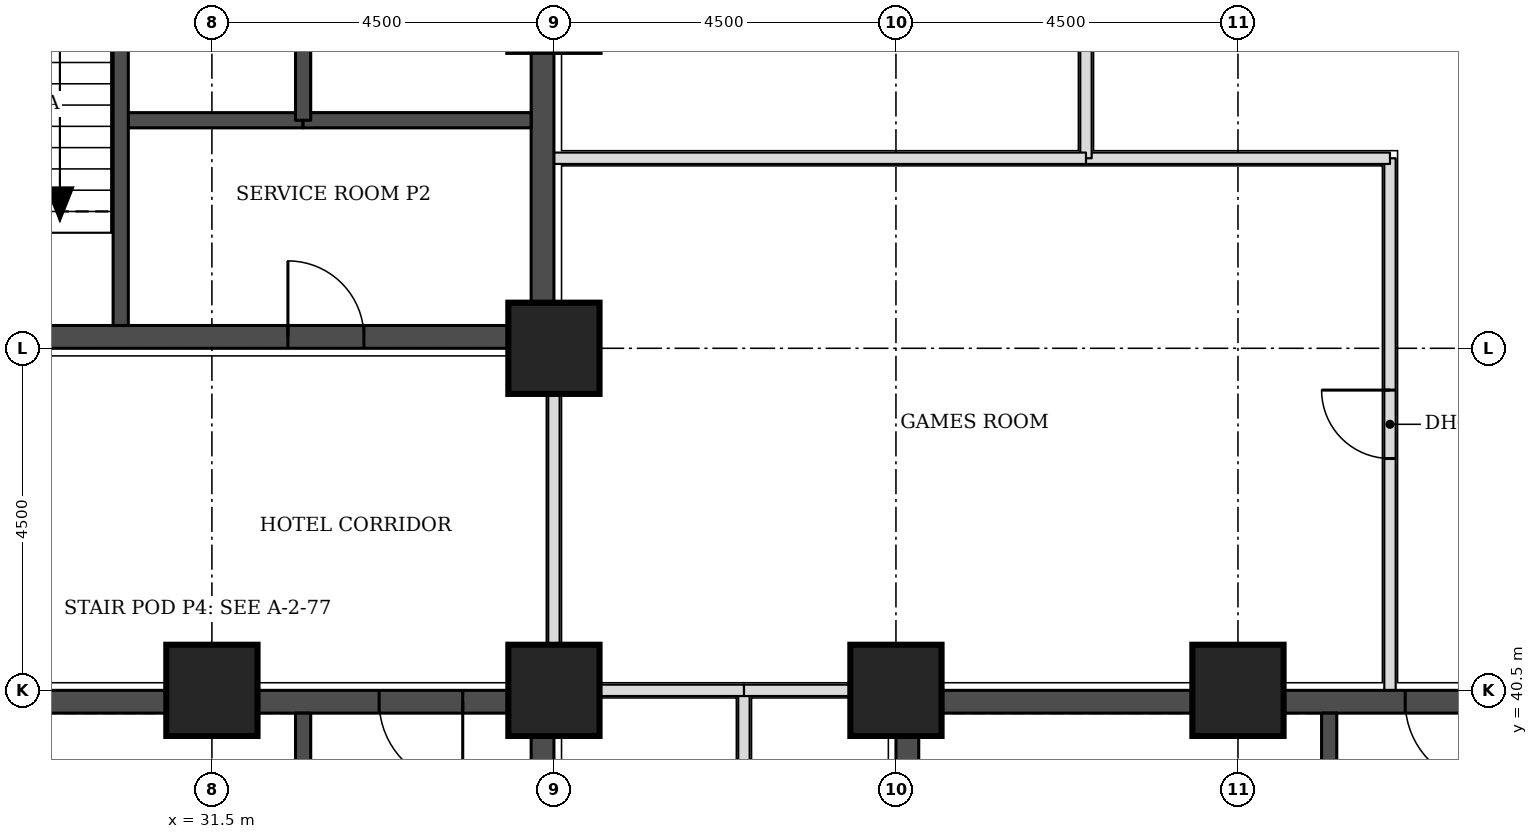
"""IFC4 building model, lengths in metres.
Left out: names, types, materials, properties, quantities, classifications, styles, units other than length and angle.
Written with IfcOpenShell. Run it as: python <this file> out.ifc"""

import sys

from ifc_helpers import new_model, si_unit, direction, frame, frame_2d, origin, origin_2d, place, context, subcontext, project, spatial, rectangle, extrude, element, fill, save


model = new_model("IFC4")
c1 = context("Model", 3, precision=1e-05, world=origin(), true_north=direction((0.0, 1.0)))
c2 = subcontext(c1, "Body", "Model", "MODEL_VIEW")
j1 = project(units=[si_unit("LENGTHUNIT", "METRE"), si_unit("PLANEANGLEUNIT", "RADIAN")], contexts=[c1])
p1 = place(None, origin())
s1 = spatial("IfcSite", under=j1, at=p1, CompositionType="ELEMENT")
p2 = place(p1, origin())
s2 = spatial("IfcBuilding", under=s1, at=p2, CompositionType="ELEMENT")
p3 = place(p2, frame((0.0, 0.0, 39.6)))
s3 = spatial("IfcBuildingStorey", under=s2, at=p3, CompositionType="ELEMENT", Elevation=39.6)
for number, where, z_axis, x_axis in (
    (1, (31.5, 40.5, 0.0), (0.0, 0.0, 1.0), (1.0, 0.0, 0.0)),
    (2, (36.0, 40.5, 0.0), (0.0, 0.0, 1.0), (1.0, 0.0, 0.0)),
    (3, (40.5, 40.5, 0.0), (0.0, 0.0, 1.0), (1.0, 0.0, 0.0)),
    (4, (45.0, 40.5, 0.0), (0.0, 0.0, 1.0), (1.0, 0.0, 0.0)),
    (5, (36.0, 45.0, 0.0), (0.0, 0.0, 1.0), (1.0, 0.0, 0.0)),
):
    element("IfcColumn", number, at=place(p3, frame(where, z_axis=z_axis, x_axis=x_axis)), inside=s3, PredefinedType="COLUMN", context=c2, shape_type="SweptSolid", body=[
        extrude(rectangle(XDim=1.2, YDim=1.2, at=origin_2d()), origin(), (0.0, 0.0, 1.0), 3.3),
    ])
p4 = place(p3, frame((27.3, 45.15, 0.0), z_axis=(0.0, 0.0, 1.0), x_axis=(1.0, 0.0, 0.0)))
e6 = element("IfcWall", 6, at=p4, inside=s3, PredefinedType="SHEAR", context=c2, shape_type="SweptSolid", body=[
    extrude(rectangle(XDim=8.4, YDim=0.3, at=frame_2d((4.2, 0.0))), origin(), (0.0, 0.0, 1.0), 3.3),
])
p5 = place(p4, frame((5.2, 0.0, 0.0)))
e7 = element("IfcOpeningElement", 7, at=p5, cuts=e6, PredefinedType="OPENING", context=c2, shape_type="SweptSolid", body=[
    extrude(rectangle(XDim=1.0, YDim=2.1, at=frame_2d((0.5, 1.05))), frame((0.0, 0.16, 0.0), z_axis=(0.0, -1.0, 0.0), x_axis=(1.0, 0.0, 0.0)), (0.0, 0.0, 1.0), 0.32),
])
p6 = place(p3, frame((35.85, 45.0, 0.0), z_axis=(0.0, 0.0, 1.0), x_axis=(0.0, 1.0, 0.0)))
e8 = element("IfcWall", 8, at=p6, inside=s3, PredefinedType="SHEAR", context=c2, shape_type="SweptSolid", body=[
    extrude(rectangle(XDim=9.0, YDim=0.3, at=frame_2d((4.5, 0.0))), origin(), (0.0, 0.0, 1.0), 3.3),
])
p7 = place(p3, frame((40.8, 40.35, 0.0), z_axis=(0.0, 0.0, 1.0), x_axis=(1.0, 0.0, 0.0)))
e9 = element("IfcWall", 9, at=p7, inside=s3, PredefinedType="SHEAR", context=c2, shape_type="SweptSolid", body=[
    extrude(rectangle(XDim=8.4, YDim=0.3, at=frame_2d((4.2, 0.0))), origin(), (0.0, 0.0, 1.0), 3.3),
])
p8 = place(p7, frame((6.4, 0.0, 0.0)))
e10 = element("IfcOpeningElement", 10, at=p8, cuts=e9, PredefinedType="OPENING", context=c2, shape_type="SweptSolid", body=[
    extrude(rectangle(XDim=1.1, YDim=2.1, at=frame_2d((0.55, 1.05))), frame((0.0, 0.16, 0.0), z_axis=(0.0, -1.0, 0.0), x_axis=(1.0, 0.0, 0.0)), (0.0, 0.0, 1.0), 0.32),
])
p9 = place(p3, frame((40.65, 31.5, 0.0), z_axis=(0.0, 0.0, 1.0), x_axis=(0.0, 1.0, 0.0)))
e11 = element("IfcWall", 11, at=p9, inside=s3, PredefinedType="SHEAR", context=c2, shape_type="SweptSolid", body=[
    extrude(rectangle(XDim=9.0, YDim=0.3, at=frame_2d((4.5, 0.0))), origin(), (0.0, 0.0, 1.0), 3.3),
])
p10 = place(p9, frame((0.4, 0.0, 0.0)))
e12 = element("IfcOpeningElement", 12, at=p10, cuts=e11, PredefinedType="OPENING", context=c2, shape_type="SweptSolid", body=[
    extrude(rectangle(XDim=1.1, YDim=2.1, at=frame_2d((0.55, 1.05))), frame((0.0, 0.16, 0.0), z_axis=(0.0, -1.0, 0.0), x_axis=(1.0, 0.0, 0.0)), (0.0, 0.0, 1.0), 0.32),
])
p11 = place(p3, frame((27.3, 40.35, 0.0), z_axis=(0.0, 0.0, 1.0), x_axis=(1.0, 0.0, 0.0)))
e13 = element("IfcWall", 13, at=p11, inside=s3, PredefinedType="SHEAR", context=c2, shape_type="SweptSolid", body=[
    extrude(rectangle(XDim=8.4, YDim=0.3, at=frame_2d((4.2, 0.0))), origin(), (0.0, 0.0, 1.0), 3.3),
])
p12 = place(p11, frame((6.4, 0.0, 0.0)))
e14 = element("IfcOpeningElement", 14, at=p12, cuts=e13, PredefinedType="OPENING", context=c2, shape_type="SweptSolid", body=[
    extrude(rectangle(XDim=1.1, YDim=2.1, at=frame_2d((0.55, 1.05))), frame((0.0, 0.16, 0.0), z_axis=(0.0, -1.0, 0.0), x_axis=(1.0, 0.0, 0.0)), (0.0, 0.0, 1.0), 0.32),
])
p13 = place(p3, frame((35.85, 31.5, 0.0), z_axis=(0.0, 0.0, 1.0), x_axis=(0.0, 1.0, 0.0)))
e15 = element("IfcWall", 15, at=p13, inside=s3, PredefinedType="SHEAR", context=c2, shape_type="SweptSolid", body=[
    extrude(rectangle(XDim=9.0, YDim=0.3, at=frame_2d((4.5, 0.0))), origin(), (0.0, 0.0, 1.0), 3.3),
])
p14 = place(p3, frame((38.5, 27.15, 0.0), z_axis=(0.0, 0.0, 1.0), x_axis=(0.0, 1.0, 0.0)))
e16 = element("IfcWall", 16, at=p14, inside=s3, PredefinedType="PARTITIONING", context=c2, shape_type="SweptSolid", body=[
    extrude(rectangle(XDim=13.35, YDim=0.15, at=frame_2d((6.675, 0.0))), origin(), (0.0, 0.0, 1.0), 3.08),
])
p15 = place(p14, frame((6.225, 0.0, 0.0)))
e17 = element("IfcOpeningElement", 17, at=p15, cuts=e16, PredefinedType="OPENING", context=c2, shape_type="SweptSolid", body=[
    extrude(rectangle(XDim=0.9, YDim=2.1, at=frame_2d((0.45, 1.05))), frame((0.0, 0.085, 0.0), z_axis=(0.0, -1.0, 0.0), x_axis=(1.0, 0.0, 0.0)), (0.0, 0.0, 1.0), 0.17),
])
p16 = place(p3, frame((38.5, 40.5, 0.0), z_axis=(0.0, 0.0, 1.0), x_axis=(1.0, 0.0, 0.0)))
e18 = element("IfcWall", 18, at=p16, inside=s3, PredefinedType="PARTITIONING", context=c2, shape_type="SweptSolid", body=[
    extrude(rectangle(XDim=1.95, YDim=0.15, at=frame_2d((0.975, 0.0))), origin(), (0.0, 0.0, 1.0), 2.33),
])
p17 = place(p3, frame((36.0, 40.55, 0.0), z_axis=(0.0, 0.0, 1.0), x_axis=(0.0, 1.0, 0.0)))
e19 = element("IfcWall", 19, at=p17, inside=s3, PredefinedType="PARTITIONING", context=c2, shape_type="SweptSolid", body=[
    extrude(rectangle(XDim=4.4, YDim=0.15, at=frame_2d((2.2, 0.0))), origin(), (0.0, 0.0, 1.0), 2.33),
])
p18 = place(p3, frame((47.0, 40.5, 0.0), z_axis=(0.0, 0.0, 1.0), x_axis=(0.0, 1.0, 0.0)))
e20 = element("IfcWall", 20, at=p18, inside=s3, PredefinedType="PARTITIONING", context=c2, shape_type="SweptSolid", body=[
    extrude(rectangle(XDim=7.0, YDim=0.15, at=frame_2d((3.5, 0.0))), origin(), (0.0, 0.0, 1.0), 3.08),
])
p19 = place(p18, frame((3.05, 0.0, 0.0)))
e21 = element("IfcOpeningElement", 21, at=p19, cuts=e20, PredefinedType="OPENING", context=c2, shape_type="SweptSolid", body=[
    extrude(rectangle(XDim=0.9, YDim=2.1, at=frame_2d((0.45, 1.05))), frame((0.0, 0.085, 0.0), z_axis=(0.0, -1.0, 0.0), x_axis=(1.0, 0.0, 0.0)), (0.0, 0.0, 1.0), 0.17),
])
p20 = place(p3, frame((43.0, 47.5, 0.0), z_axis=(0.0, 0.0, 1.0), x_axis=(1.0, 0.0, 0.0)))
e22 = element("IfcWall", 22, at=p20, inside=s3, PredefinedType="PARTITIONING", context=c2, shape_type="SweptSolid", body=[
    extrude(rectangle(XDim=4.0, YDim=0.15, at=frame_2d((2.0, 0.0))), origin(), (0.0, 0.0, 1.0), 3.08),
])
p21 = place(p3, frame((43.0, 47.5, 0.0), z_axis=(0.0, 0.0, 1.0), x_axis=(0.0, 1.0, 0.0)))
e23 = element("IfcWall", 23, at=p21, inside=s3, PredefinedType="PARTITIONING", context=c2, shape_type="SweptSolid", body=[
    extrude(rectangle(XDim=7.85, YDim=0.15, at=frame_2d((3.925, 0.0))), origin(), (0.0, 0.0, 1.0), 3.08),
])
p22 = place(p21, frame((3.475, 0.0, 0.0)))
e24 = element("IfcOpeningElement", 24, at=p22, cuts=e23, PredefinedType="OPENING", context=c2, shape_type="SweptSolid", body=[
    extrude(rectangle(XDim=0.9, YDim=2.1, at=frame_2d((0.45, 1.05))), frame((0.0, 0.085, 0.0), z_axis=(0.0, -1.0, 0.0), x_axis=(1.0, 0.0, 0.0)), (0.0, 0.0, 1.0), 0.17),
])
p23 = place(p3, frame((36.05, 40.5, 0.0), z_axis=(0.0, 0.0, 1.0), x_axis=(1.0, 0.0, 0.0)))
e25 = element("IfcWall", 25, at=p23, inside=s3, PredefinedType="PARTITIONING", context=c2, shape_type="SweptSolid", body=[
    extrude(rectangle(XDim=2.45, YDim=0.15, at=frame_2d((1.225, 0.0))), origin(), (0.0, 0.0, 1.0), 2.33),
])
p24 = place(p3, frame((36.0, 47.5, 0.0), z_axis=(0.0, 0.0, 1.0), x_axis=(1.0, 0.0, 0.0)))
e26 = element("IfcWall", 26, at=p24, inside=s3, PredefinedType="PARTITIONING", context=c2, shape_type="SweptSolid", body=[
    extrude(rectangle(XDim=7.0, YDim=0.15, at=frame_2d((3.5, 0.0))), origin(), (0.0, 0.0, 1.0), 3.08),
])
p25 = place(p3, frame((30.3, 48.0, 0.0), z_axis=(0.0, 0.0, 1.0), x_axis=(1.0, 0.0, 0.0)))
e27 = element("IfcWall", 27, at=p25, inside=s3, PredefinedType="SOLIDWALL", context=c2, shape_type="SweptSolid", body=[
    extrude(rectangle(XDim=2.4, YDim=0.2, at=frame_2d((1.2, 0.0))), origin(), (0.0, 0.0, 1.0), 3.08),
])
p26 = place(p3, frame((32.7, 48.0, 0.0), z_axis=(0.0, 0.0, 1.0), x_axis=(1.0, 0.0, 0.0)))
e28 = element("IfcWall", 28, at=p26, inside=s3, PredefinedType="SOLIDWALL", context=c2, shape_type="SweptSolid", body=[
    extrude(rectangle(XDim=3.0, YDim=0.2, at=frame_2d((1.5, 0.0))), origin(), (0.0, 0.0, 1.0), 3.08),
])
for number, where, z_axis, x_axis in (
    (29, (30.3, 45.3, 0.0), (0.0, 0.0, 1.0), (0.0, 1.0, 0.0)),
    (30, (32.7, 48.0, 0.0), (0.0, 0.0, 1.0), (0.0, 1.0, 0.0)),
    (31, (46.2, 34.5, 0.0), (0.0, 0.0, 1.0), (0.0, 1.0, 0.0)),
    (32, (32.7, 34.5, 0.0), (0.0, 0.0, 1.0), (0.0, 1.0, 0.0)),
):
    element("IfcWall", number, at=place(p3, frame(where, z_axis=z_axis, x_axis=x_axis)), inside=s3, PredefinedType="SOLIDWALL", context=c2, shape_type="SweptSolid", body=[
        extrude(rectangle(XDim=5.7, YDim=0.2, at=frame_2d((2.85, 0.0))), origin(), (0.0, 0.0, 1.0), 3.08),
    ])
p27 = place(p19, origin())
e33 = element("IfcDoor", 33, at=p27, inside=s3, OperationType="SINGLE_SWING_RIGHT", PredefinedType="DOOR", context=c2, shape_type="SweptSolid", body=[
    extrude(rectangle(XDim=0.9, YDim=2.1, at=frame_2d((0.45, 1.05))), frame((0.0, 0.025, 0.0), z_axis=(0.0, -1.0, 0.0), x_axis=(1.0, 0.0, 0.0)), (0.0, 0.0, 1.0), 0.05),
])
fill(e21, e33)
p28 = place(p5, origin())
e34 = element("IfcDoor", 34, at=p28, inside=s3, OperationType="SINGLE_SWING_LEFT", PredefinedType="DOOR", context=c2, shape_type="SweptSolid", body=[
    extrude(rectangle(XDim=1.0, YDim=2.1, at=frame_2d((0.5, 1.05))), frame((0.0, 0.025, 0.0), z_axis=(0.0, -1.0, 0.0), x_axis=(1.0, 0.0, 0.0)), (0.0, 0.0, 1.0), 0.05),
])
fill(e7, e34)
p29 = place(p8, frame((1.1, 0.0, 0.0), z_axis=(0.0, 0.0, 1.0), x_axis=(-1.0, 0.0, 0.0)))
e35 = element("IfcDoor", 35, at=p29, inside=s3, OperationType="SINGLE_SWING_LEFT", PredefinedType="DOOR", context=c2, shape_type="SweptSolid", body=[
    extrude(rectangle(XDim=1.1, YDim=2.1, at=frame_2d((0.55, 1.05))), frame((0.0, 0.025, 0.0), z_axis=(0.0, -1.0, 0.0), x_axis=(1.0, 0.0, 0.0)), (0.0, 0.0, 1.0), 0.05),
])
fill(e10, e35)
p30 = place(p12, frame((1.1, 0.0, 0.0), z_axis=(0.0, 0.0, 1.0), x_axis=(-1.0, 0.0, 0.0)))
e36 = element("IfcDoor", 36, at=p30, inside=s3, OperationType="SINGLE_SWING_LEFT", PredefinedType="DOOR", context=c2, shape_type="SweptSolid", body=[
    extrude(rectangle(XDim=1.1, YDim=2.1, at=frame_2d((0.55, 1.05))), frame((0.0, 0.025, 0.0), z_axis=(0.0, -1.0, 0.0), x_axis=(1.0, 0.0, 0.0)), (0.0, 0.0, 1.0), 0.05),
])
fill(e14, e36)
save(model, sys.argv[1])
